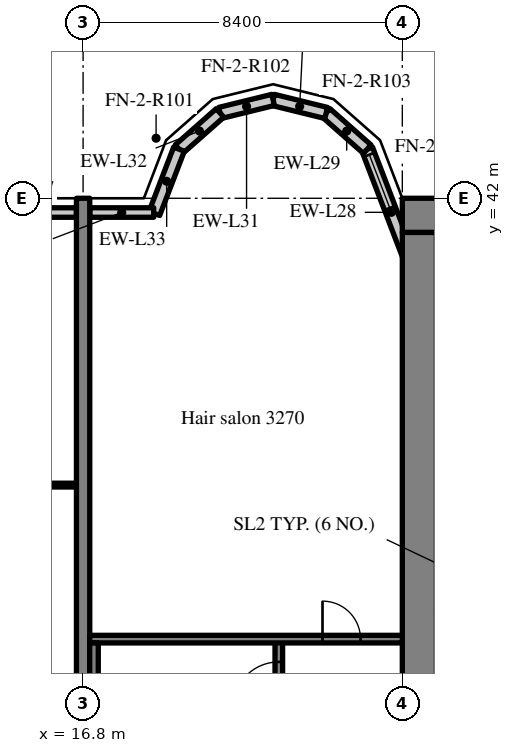
"""IFC4 building model, lengths in metres.
Left out: names, types, materials, properties, quantities, classifications, styles, units other than length and angle.
Written with IfcOpenShell. Run it as: python <this file> out.ifc"""

import sys

from ifc_helpers import new_model, si_unit, direction, frame, frame_2d, origin, place, context, subcontext, project, spatial, rectangle, extrude, source, transform, mapped, element, fill, save


model = new_model("IFC4")
c1 = context("Model", 3, precision=1e-05, world=origin(), true_north=direction((0.0, 1.0)))
c2 = subcontext(c1, "Body", "Model", "MODEL_VIEW")
j1 = project(units=[si_unit("LENGTHUNIT", "METRE"), si_unit("PLANEANGLEUNIT", "RADIAN")], contexts=[c1])
p1 = place(None, origin())
s1 = spatial("IfcSite", under=j1, at=p1, CompositionType="ELEMENT")
p2 = place(p1, origin())
s2 = spatial("IfcBuilding", under=s1, at=p2, CompositionType="ELEMENT")
p3 = place(p2, frame((0.0, 0.0, 133.2)))
s3 = spatial("IfcBuildingStorey", under=s2, at=p3, CompositionType="ELEMENT", Elevation=133.2)
m1 = source(origin(), c2, "Body", "SweptSolid", [
    extrude(rectangle(XDim=50.4, YDim=0.9, at=frame_2d((25.2, 0.0))), origin(), (0.0, 0.0, 1.0), 3.52),
])
p4 = place(p3, frame((25.2, 41.55, 0.0), z_axis=(0.0, 0.0, 1.0), x_axis=(1.0, 0.0, 0.0)))
e1 = element("IfcWall", 1, at=p4, inside=s3, PredefinedType="SHEAR", context=c2, shape_type="MappedRepresentation", body=[
    mapped(m1, transform((0.0, 0.0, 0.0), scale=1.0)),
])
m2 = source(origin(), c2, "Body", "SweptSolid", [
    extrude(rectangle(XDim=18.2, YDim=0.9, at=frame_2d((9.1, 0.0))), origin(), (0.0, 0.0, 1.0), 3.52),
])
p5 = place(p3, frame((25.65, 22.9, 0.0), z_axis=(0.0, 0.0, 1.0), x_axis=(0.0, 1.0, 0.0)))
e2 = element("IfcWall", 2, at=p5, inside=s3, PredefinedType="SHEAR", context=c2, shape_type="MappedRepresentation", body=[
    mapped(m2, transform((0.0, 0.0, 0.0), scale=1.0)),
])
m3 = source(origin(), c2, "Body", "SweptSolid", [
    extrude(rectangle(XDim=20.0, YDim=0.35, at=frame_2d((10.0, 0.0))), origin(), (0.0, 0.0, 1.0), 3.52),
])
p6 = place(p3, frame((16.8, 22.0, 0.0), z_axis=(0.0, 0.0, 1.0), x_axis=(0.0, 1.0, 0.0)))
e3 = element("IfcWall", 3, at=p6, inside=s3, PredefinedType="SHEAR", context=c2, shape_type="MappedRepresentation", body=[
    mapped(m3, transform((0.0, 0.0, 0.0), scale=1.0)),
])
m4 = source(origin(), c2, "Body", "SweptSolid", [
    extrude(rectangle(XDim=3.559, YDim=0.3, at=frame_2d((1.78, 0.0))), origin(), (0.0, 0.0, 1.0), 3.52),
])
p7 = place(p3, frame((25.55, 39.969, 0.0), z_axis=(0.0, 0.0, 1.0), x_axis=(-0.35779745313, 0.933799219604, 0.0)))
e4 = element("IfcWall", 4, at=p7, inside=s3, PredefinedType="SOLIDWALL", context=c2, shape_type="MappedRepresentation", body=[
    mapped(m4, transform((0.0, 0.0, 0.0), scale=1.0)),
])
m5 = source(origin(), c2, "Body", "SweptSolid", [
    extrude(rectangle(XDim=1.5, YDim=2.0, at=frame_2d((0.75, 1.0))), frame((0.0, 0.16, 0.0), z_axis=(0.0, -1.0, 0.0), x_axis=(1.0, 0.0, 0.0)), (0.0, 0.0, 1.0), 0.32),
])
p8 = place(p7, frame((1.903, 0.0, 0.9)))
e5 = element("IfcOpeningElement", 5, at=p8, cuts=e4, PredefinedType="OPENING", context=c2, shape_type="MappedRepresentation", body=[
    mapped(m5, transform((0.0, 0.0, 0.0), scale=1.0)),
])
m6 = source(origin(), c2, "Body", "SweptSolid", [
    extrude(rectangle(XDim=1.44, YDim=0.3, at=frame_2d((0.72, 0.0))), origin(), (0.0, 0.0, 1.0), 3.52),
])
p9 = place(p3, frame((24.277, 43.292, 0.0), z_axis=(0.0, 0.0, 1.0), x_axis=(-0.749649827867, 0.661834673902, 0.0)))
e6 = element("IfcWall", 6, at=p9, inside=s3, PredefinedType="SOLIDWALL", context=c2, shape_type="MappedRepresentation", body=[
    mapped(m6, transform((0.0, 0.0, 0.0), scale=1.0)),
])
m7 = source(origin(), c2, "Body", "SweptSolid", [
    extrude(rectangle(XDim=1.438, YDim=0.3, at=frame_2d((0.719, 0.0))), origin(), (0.0, 0.0, 1.0), 3.52),
])
p10 = place(p3, frame((23.197, 44.245, 0.0), z_axis=(0.0, 0.0, 1.0), x_axis=(-0.971152283879, 0.238460146601, 0.0)))
e7 = element("IfcWall", 7, at=p10, inside=s3, PredefinedType="SOLIDWALL", context=c2, shape_type="MappedRepresentation", body=[
    mapped(m7, transform((0.0, 0.0, 0.0), scale=1.0)),
])
m8 = source(origin(), c2, "Body", "SweptSolid", [
    extrude(rectangle(XDim=1.439, YDim=0.3, at=frame_2d((0.719, 0.0))), origin(), (0.0, 0.0, 1.0), 3.52),
])
p11 = place(p3, frame((21.8, 44.588, 0.0), z_axis=(0.0, 0.0, 1.0), x_axis=(-0.971161932466, -0.238420848351, 0.0)))
e8 = element("IfcWall", 8, at=p11, inside=s3, PredefinedType="SOLIDWALL", context=c2, shape_type="MappedRepresentation", body=[
    mapped(m8, transform((0.0, 0.0, 0.0), scale=1.0)),
])
m9 = source(origin(), c2, "Body", "SweptSolid", [
    extrude(rectangle(XDim=1.44, YDim=0.3, at=frame_2d((0.72, 0.0))), origin(), (0.0, 0.0, 1.0), 3.52),
])
p12 = place(p3, frame((20.403, 44.245, 0.0), z_axis=(0.0, 0.0, 1.0), x_axis=(-0.74957555648, -0.661918790432, 0.0)))
e9 = element("IfcWall", 9, at=p12, inside=s3, PredefinedType="SOLIDWALL", context=c2, shape_type="MappedRepresentation", body=[
    mapped(m9, transform((0.0, 0.0, 0.0), scale=1.0)),
])
m10 = source(origin(), c2, "Body", "SweptSolid", [
    extrude(rectangle(XDim=1.812, YDim=0.3, at=frame_2d((0.906, 0.0))), origin(), (0.0, 0.0, 1.0), 3.52),
])
p13 = place(p3, frame((19.323, 43.292, 0.0), z_axis=(0.0, 0.0, 1.0), x_axis=(-0.357877270961, -0.93376863244, 0.0)))
e10 = element("IfcWall", 10, at=p13, inside=s3, PredefinedType="SOLIDWALL", context=c2, shape_type="MappedRepresentation", body=[
    mapped(m10, transform((0.0, 0.0, 0.0), scale=1.0)),
])
m11 = source(origin(), c2, "Body", "SweptSolid", [
    extrude(rectangle(XDim=3.675, YDim=0.25, at=frame_2d((1.837, 0.0))), origin(), (0.0, 0.0, 1.0), 2.82),
])
p14 = place(p3, frame((16.625, 41.625, 0.0), z_axis=(0.0, 0.0, 1.0), x_axis=(-1.0, 0.0, 0.0)))
e11 = element("IfcWall", 11, at=p14, inside=s3, PredefinedType="SOLIDWALL", context=c2, shape_type="MappedRepresentation", body=[
    mapped(m11, transform((0.0, 0.0, 0.0), scale=1.0)),
])
m12 = source(origin(), c2, "Body", "SweptSolid", [
    extrude(rectangle(XDim=1.5, YDim=1.5, at=frame_2d((0.75, 0.75))), frame((0.0, 0.135, 0.0), z_axis=(0.0, -1.0, 0.0), x_axis=(1.0, 0.0, 0.0)), (0.0, 0.0, 1.0), 0.27),
])
p15 = place(p14, frame((1.087, 0.0, 0.9)))
e12 = element("IfcOpeningElement", 12, at=p15, cuts=e11, PredefinedType="OPENING", context=c2, shape_type="MappedRepresentation", body=[
    mapped(m12, transform((0.0, 0.0, 0.0), scale=1.0)),
])
m13 = source(origin(), c2, "Body", "SweptSolid", [
    extrude(rectangle(XDim=1.683, YDim=0.25, at=frame_2d((0.841, 0.0))), origin(), (0.0, 0.0, 1.0), 2.82),
])
p16 = place(p3, frame((18.658, 41.625, 0.0), z_axis=(0.0, 0.0, 1.0), x_axis=(-1.0, 0.0, 0.0)))
e13 = element("IfcWall", 13, at=p16, inside=s3, PredefinedType="SOLIDWALL", context=c2, shape_type="MappedRepresentation", body=[
    mapped(m13, transform((0.0, 0.0, 0.0), scale=1.0)),
])
m14 = source(origin(), c2, "Body", "SweptSolid", [
    extrude(rectangle(XDim=8.3, YDim=0.2, at=frame_2d((4.15, 0.0))), origin(), (0.0, 0.0, 1.0), 3.52),
])
p17 = place(p3, frame((21.95, 22.1, 0.0), z_axis=(0.0, 0.0, 1.0), x_axis=(0.0, 1.0, 0.0)))
e14 = element("IfcWall", 14, at=p17, inside=s3, PredefinedType="SOLIDWALL", context=c2, shape_type="MappedRepresentation", body=[
    mapped(m14, transform((0.0, 0.0, 0.0), scale=1.0)),
])
m15 = source(origin(), c2, "Body", "SweptSolid", [
    extrude(rectangle(XDim=1.2, YDim=2.1, at=frame_2d((0.6, 1.05))), frame((0.0, 0.11, 0.0), z_axis=(0.0, -1.0, 0.0), x_axis=(1.0, 0.0, 0.0)), (0.0, 0.0, 1.0), 0.22),
])
p18 = place(p17, frame((6.5, 0.0, 0.0)))
e15 = element("IfcOpeningElement", 15, at=p18, cuts=e14, PredefinedType="OPENING", context=c2, shape_type="MappedRepresentation", body=[
    mapped(m15, transform((0.0, 0.0, 0.0), scale=1.0)),
])
m16 = source(origin(), c2, "Body", "SweptSolid", [
    extrude(rectangle(XDim=8.225, YDim=0.2, at=frame_2d((4.112, 0.0))), origin(), (0.0, 0.0, 1.0), 3.52),
])
p19 = place(p3, frame((16.975, 30.4, 0.0), z_axis=(0.0, 0.0, 1.0), x_axis=(1.0, 0.0, 0.0)))
e16 = element("IfcWall", 16, at=p19, inside=s3, PredefinedType="SOLIDWALL", context=c2, shape_type="MappedRepresentation", body=[
    mapped(m16, transform((0.0, 0.0, 0.0), scale=1.0)),
])
m17 = source(origin(), c2, "Body", "SweptSolid", [
    extrude(rectangle(XDim=1.0, YDim=2.1, at=frame_2d((0.5, 1.05))), frame((0.0, 0.11, 0.0), z_axis=(0.0, -1.0, 0.0), x_axis=(1.0, 0.0, 0.0)), (0.0, 0.0, 1.0), 0.22),
])
p20 = place(p19, frame((6.125, 0.0, 0.0)))
e17 = element("IfcOpeningElement", 17, at=p20, cuts=e16, PredefinedType="OPENING", context=c2, shape_type="MappedRepresentation", body=[
    mapped(m17, transform((0.0, 0.0, 0.0), scale=1.0)),
])
m18 = source(origin(), c2, "Body", "SweptSolid", [
    extrude(rectangle(XDim=8.1, YDim=0.225, at=frame_2d((4.05, 0.0))), origin(), (0.0, 0.0, 1.0), 3.52),
])
p21 = place(p3, frame((17.087, 22.2, 0.0), z_axis=(0.0, 0.0, 1.0), x_axis=(0.0, 1.0, 0.0)))
e18 = element("IfcWall", 18, at=p21, inside=s3, PredefinedType="SOLIDWALL", context=c2, shape_type="MappedRepresentation", body=[
    mapped(m18, transform((0.0, 0.0, 0.0), scale=1.0)),
])
m19 = source(origin(), c2, "Body", "SweptSolid", [
    extrude(rectangle(XDim=8.05, YDim=0.1, at=frame_2d((4.025, 0.0))), origin(), (0.0, 0.0, 1.0), 3.52),
])
p22 = place(p3, frame((8.575, 34.453, 0.0), z_axis=(0.0, 0.0, 1.0), x_axis=(1.0, 0.0, 0.0)))
e19 = element("IfcWall", 19, at=p22, inside=s3, PredefinedType="PARTITIONING", context=c2, shape_type="MappedRepresentation", body=[
    mapped(m19, transform((0.0, 0.0, 0.0), scale=1.0)),
])
m20 = source(origin(), c2, "Body", "SweptSolid", [
    extrude(rectangle(XDim=1.8, YDim=2.1, at=frame_2d((0.9, 1.05))), frame((0.0, 0.06, 0.0), z_axis=(0.0, -1.0, 0.0), x_axis=(1.0, 0.0, 0.0)), (0.0, 0.0, 1.0), 0.12),
])
p23 = place(p22, frame((3.125, 0.0, 0.0)))
e20 = element("IfcOpeningElement", 20, at=p23, cuts=e19, PredefinedType="OPENING", context=c2, shape_type="MappedRepresentation", body=[
    mapped(m20, transform((0.0, 0.0, 0.0), scale=1.0)),
])
m21 = source(origin(), c2, "Body", "SweptSolid", [
    extrude(rectangle(XDim=1.5, YDim=2.0, at=frame_2d((0.75, 1.0))), frame((0.0, 0.03, 0.0), z_axis=(0.0, -1.0, 0.0), x_axis=(1.0, 0.0, 0.0)), (0.0, 0.0, 1.0), 0.06),
])
p24 = place(p8, origin())
e21 = element("IfcWindow", 21, at=p24, inside=s3, PartitioningType="SINGLE_PANEL", PredefinedType="WINDOW", context=c2, shape_type="MappedRepresentation", body=[
    mapped(m21, transform((0.0, 0.0, 0.0), scale=1.0)),
])
fill(e5, e21)
m22 = source(origin(), c2, "Body", "SweptSolid", [
    extrude(rectangle(XDim=1.2, YDim=2.1, at=frame_2d((0.6, 1.05))), frame((0.0, 0.025, 0.0), z_axis=(0.0, -1.0, 0.0), x_axis=(1.0, 0.0, 0.0)), (0.0, 0.0, 1.0), 0.05),
])
p25 = place(p18, origin())
e22 = element("IfcDoor", 22, at=p25, inside=s3, OperationType="SINGLE_SWING_LEFT", PredefinedType="DOOR", context=c2, shape_type="MappedRepresentation", body=[
    mapped(m22, transform((0.0, 0.0, 0.0), scale=1.0)),
])
fill(e15, e22)
m23 = source(origin(), c2, "Body", "SweptSolid", [
    extrude(rectangle(XDim=1.0, YDim=2.1, at=frame_2d((0.5, 1.05))), frame((0.0, 0.025, 0.0), z_axis=(0.0, -1.0, 0.0), x_axis=(1.0, 0.0, 0.0)), (0.0, 0.0, 1.0), 0.05),
])
p26 = place(p20, origin())
e23 = element("IfcDoor", 23, at=p26, inside=s3, OperationType="SINGLE_SWING_LEFT", PredefinedType="DOOR", context=c2, shape_type="MappedRepresentation", body=[
    mapped(m23, transform((0.0, 0.0, 0.0), scale=1.0)),
])
fill(e17, e23)
save(model, sys.argv[1])
